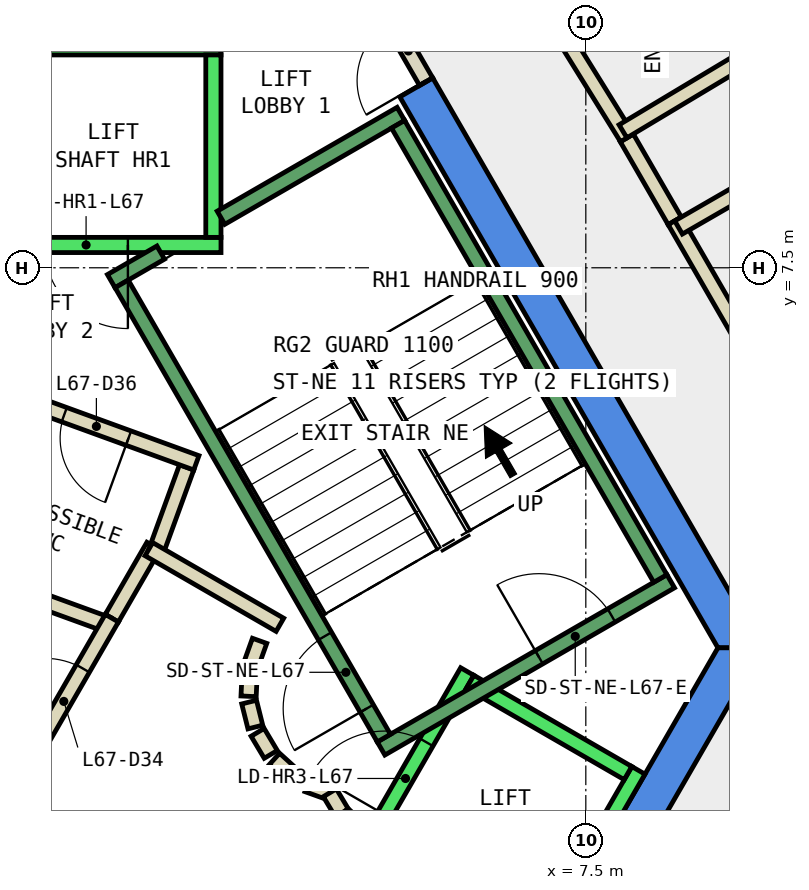
"""IFC4 building model, lengths in metres.
Left out: names, types, materials, properties, quantities, classifications, styles, units other than length and angle.
Written with IfcOpenShell. Run it as: python <this file> out.ifc"""

import sys

from ifc_helpers import new_model, si_unit, direction, frame, frame_2d, origin, place, context, subcontext, project, spatial, polyline, rectangle, outline, extrude, element, fill, save


model = new_model("IFC4")
c1 = context("Model", 3, precision=1e-05, world=origin(), true_north=direction((0.0, 1.0)))
c2 = subcontext(c1, "Body", "Model", "MODEL_VIEW")
j1 = project(units=[si_unit("LENGTHUNIT", "METRE"), si_unit("PLANEANGLEUNIT", "RADIAN")], contexts=[c1])
p1 = place(None, origin())
s1 = spatial("IfcSite", under=j1, at=p1, CompositionType="ELEMENT")
p2 = place(p1, origin())
s2 = spatial("IfcBuilding", under=s1, at=p2, CompositionType="ELEMENT")
p3 = place(p2, frame((0.0, 0.0, 290.0)))
s3 = spatial("IfcBuildingStorey", under=s2, at=p3, CompositionType="ELEMENT", Elevation=290.0)
p4 = place(p3, frame((0.0, 0.0, -0.34)))
e1 = element("IfcWall", 1, at=p4, inside=s3, PredefinedType="SHEAR", context=c2, shape_type="SweptSolid", body=[
    extrude(outline(polyline([(5.486, 9.998), (5.053, 9.748), (9.238, 2.5), (9.815, 2.5), (5.486, 9.998)])), origin(), (0.0, 0.0, 1.0), 3.6),
])
p5 = place(p3, frame((0.0, 0.0, -0.34)))
e2 = element("IfcWall", 2, at=p5, inside=s3, PredefinedType="SHEAR", context=c2, shape_type="SweptSolid", body=[
    extrude(outline(polyline([(4.907, -6.0), (9.815, 2.5), (9.238, 2.5), (4.619, -5.5), (4.907, -6.0)])), origin(), (0.0, 0.0, 1.0), 3.6),
])
p6 = place(p3, frame((1.264, 2.89, 0.0), z_axis=(0.0, 0.0, 1.0), x_axis=(0.500043792738, 0.866000118559, 0.0)))
e3 = element("IfcWall", 3, at=p6, inside=s3, PredefinedType="PARTITIONING", context=c2, shape_type="SweptSolid", body=[
    extrude(rectangle(XDim=1.096, YDim=0.2, at=frame_2d((0.548, 0.0))), origin(), (0.0, 0.0, 1.0), 3.26),
])
p7 = place(p3, frame((1.838, 3.748, 0.0), z_axis=(0.0, 0.0, 1.0), x_axis=(0.342266462435, 0.939602931398, 0.0)))
e4 = element("IfcWall", 4, at=p7, inside=s3, PredefinedType="PARTITIONING", context=c2, shape_type="SweptSolid", body=[
    extrude(rectangle(XDim=1.198, YDim=0.2, at=frame_2d((0.599, 0.0))), origin(), (0.0, 0.0, 1.0), 3.26),
])
p8 = place(p3, frame((2.376, 4.934, 0.0), z_axis=(0.0, 0.0, 1.0), x_axis=(-0.939640574808, 0.342163104635, 0.0)))
e5 = element("IfcWall", 5, at=p8, inside=s3, PredefinedType="PARTITIONING", context=c2, shape_type="SweptSolid", body=[
    extrude(rectangle(XDim=2.8, YDim=0.2, at=frame_2d((1.4, 0.0))), origin(), (0.0, 0.0, 1.0), 3.26),
])
p9 = place(p8, frame((0.95, 0.0, 0.0)))
e6 = element("IfcOpeningElement", 6, at=p9, cuts=e5, PredefinedType="OPENING", context=c2, shape_type="SweptSolid", body=[
    extrude(rectangle(XDim=0.9, YDim=2.1, at=frame_2d((0.45, 1.05))), frame((0.0, 0.11, 0.0), z_axis=(0.0, -1.0, 0.0), x_axis=(1.0, 0.0, 0.0)), (0.0, 0.0, 1.0), 0.22),
])
p10 = place(p3, frame((-0.888, 3.568, 0.0), z_axis=(0.0, 0.0, 1.0), x_axis=(0.939685034098, -0.34204098686, 0.0)))
e7 = element("IfcWall", 7, at=p10, inside=s3, PredefinedType="PARTITIONING", context=c2, shape_type="SweptSolid", body=[
    extrude(rectangle(XDim=2.237, YDim=0.2, at=frame_2d((1.119, 0.0))), origin(), (0.0, 0.0, 1.0), 3.26),
])
p11 = place(p3, frame((8.039, 9.209, 0.0), z_axis=(0.0, 0.0, 1.0), x_axis=(0.500219543227, -0.865898613334, 0.0)))
e8 = element("IfcWall", 8, at=p11, inside=s3, PredefinedType="PARTITIONING", context=c2, shape_type="SweptSolid", body=[
    extrude(rectangle(XDim=1.261, YDim=0.2, at=frame_2d((0.631, 0.0))), origin(), (0.0, 0.0, 1.0), 3.26),
])
p12 = place(p3, frame((8.67, 8.117, 0.0), z_axis=(0.0, 0.0, 1.0), x_axis=(0.50002537861, -0.866010750942, 0.0)))
e9 = element("IfcWall", 9, at=p12, inside=s3, PredefinedType="PARTITIONING", context=c2, shape_type="SweptSolid", body=[
    extrude(rectangle(XDim=3.0, YDim=0.2, at=frame_2d((1.5, 0.0))), origin(), (0.0, 0.0, 1.0), 3.26),
])
p13 = place(p3, frame((6.775, 11.249, 0.0), z_axis=(0.0, 0.0, 1.0), x_axis=(0.527803270752, -0.849366650736, 0.0)))
e10 = element("IfcWall", 10, at=p13, inside=s3, PredefinedType="PARTITIONING", context=c2, shape_type="SweptSolid", body=[
    extrude(rectangle(XDim=2.401, YDim=0.2, at=frame_2d((1.2, 0.0))), origin(), (0.0, 0.0, 1.0), 3.26),
])
p14 = place(p3, frame((0.05, 0.787, 0.0), z_axis=(0.0, 0.0, 1.0), x_axis=(0.499945861543, 0.866056658381, 0.0)))
e11 = element("IfcWall", 11, at=p14, inside=s3, PredefinedType="PARTITIONING", context=c2, shape_type="SweptSolid", body=[
    extrude(rectangle(XDim=2.428, YDim=0.2, at=frame_2d((1.214, 0.0))), origin(), (0.0, 0.0, 1.0), 3.26),
])
p15 = place(p14, frame((0.664, 0.0, 0.0)))
e12 = element("IfcOpeningElement", 12, at=p15, cuts=e11, PredefinedType="OPENING", context=c2, shape_type="SweptSolid", body=[
    extrude(rectangle(XDim=1.0, YDim=2.1, at=frame_2d((0.5, 1.05))), frame((0.0, 0.11, 0.0), z_axis=(0.0, -1.0, 0.0), x_axis=(1.0, 0.0, 0.0)), (0.0, 0.0, 1.0), 0.22),
])
p16 = place(p3, frame((1.751, 3.798, 0.0), z_axis=(0.0, 0.0, 1.0), x_axis=(0.866091650241, -0.499885240213, 0.0)))
e13 = element("IfcWall", 13, at=p16, inside=s3, PredefinedType="PARTITIONING", context=c2, shape_type="SweptSolid", body=[
    extrude(rectangle(XDim=1.991, YDim=0.2, at=frame_2d((0.995, 0.0))), origin(), (0.0, 0.0, 1.0), 3.26),
])
p17 = place(p3, frame((3.208, 2.592, 0.0), z_axis=(0.0, 0.0, 1.0), x_axis=(-0.337388820924, -0.941365382578, 0.0)))
e14 = element("IfcWall", 14, at=p17, inside=s3, PredefinedType="PARTITIONING", context=c2, shape_type="SweptSolid", body=[
    extrude(rectangle(XDim=0.338, YDim=0.2, at=frame_2d((0.169, 0.0))), origin(), (0.0, 0.0, 1.0), 3.26),
])
p18 = place(p3, frame((3.079, 2.199, 0.0), z_axis=(0.0, 0.0, 1.0), x_axis=(-0.047771483479, -0.998858290933, 0.0)))
e15 = element("IfcWall", 15, at=p18, inside=s3, PredefinedType="PARTITIONING", context=c2, shape_type="SweptSolid", body=[
    extrude(rectangle(XDim=0.337, YDim=0.2, at=frame_2d((0.169, 0.0))), origin(), (0.0, 0.0, 1.0), 3.26),
])
p19 = place(p3, frame((3.07, 1.786, 0.0), z_axis=(0.0, 0.0, 1.0), x_axis=(0.242705583207, -0.970099994784, 0.0)))
e16 = element("IfcWall", 16, at=p19, inside=s3, PredefinedType="PARTITIONING", context=c2, shape_type="SweptSolid", body=[
    extrude(rectangle(XDim=0.338, YDim=0.2, at=frame_2d((0.169, 0.0))), origin(), (0.0, 0.0, 1.0), 3.26),
])
for number, where, z_axis, x_axis in (
    (17, (3.182, 1.388, 0.0), (0.0, 0.0, 1.0), (0.512, -0.859, 0.0)),
    (18, (3.404, 1.039, 0.0), (0.0, 0.0, 1.0), (0.74, -0.672, 0.0)),
):
    element("IfcWall", number, at=place(p3, frame(where, z_axis=z_axis, x_axis=x_axis)), inside=s3, PredefinedType="PARTITIONING", context=c2, shape_type="SweptSolid", body=[
        extrude(rectangle(XDim=0.338, YDim=0.2, at=frame_2d((0.169, 0.0))), origin(), (0.0, 0.0, 1.0), 3.26),
    ])
p20 = place(p3, frame((3.838, 0.702, 0.0), z_axis=(0.0, 0.0, 1.0), x_axis=(0.941035081519, -0.338308993895, 0.0)))
e19 = element("IfcWall", 19, at=p20, inside=s3, PredefinedType="PARTITIONING", context=c2, shape_type="SweptSolid", body=[
    extrude(rectangle(XDim=0.337, YDim=0.2, at=frame_2d((0.168, 0.0))), origin(), (0.0, 0.0, 1.0), 3.26),
])
p21 = place(p3, frame((4.132, 0.593, 0.0), z_axis=(0.0, 0.0, 1.0), x_axis=(0.513561617048, -0.858052717201, 0.0)))
e20 = element("IfcWall", 20, at=p21, inside=s3, PredefinedType="PARTITIONING", context=c2, shape_type="SweptSolid", body=[
    extrude(rectangle(XDim=0.308, YDim=0.2, at=frame_2d((0.154, 0.0))), origin(), (0.0, 0.0, 1.0), 3.26),
])
p22 = place(p3, frame((4.301, 0.315, 0.0), z_axis=(0.0, 0.0, 1.0), x_axis=(0.741798017506, -0.670623367639, 0.0)))
e21 = element("IfcWall", 21, at=p22, inside=s3, PredefinedType="PARTITIONING", context=c2, shape_type="SweptSolid", body=[
    extrude(rectangle(XDim=0.309, YDim=0.2, at=frame_2d((0.154, 0.0))), origin(), (0.0, 0.0, 1.0), 3.26),
])
p23 = place(p3, frame((10.885, 9.28, 0.0), z_axis=(0.0, 0.0, 1.0), x_axis=(-0.866022959057, -0.500004234368, 0.0)))
e22 = element("IfcWall", 22, at=p23, inside=s3, PredefinedType="PARTITIONING", context=c2, shape_type="SweptSolid", body=[
    extrude(rectangle(XDim=2.5, YDim=0.2, at=frame_2d((1.25, 0.0))), origin(), (0.0, 0.0, 1.0), 3.26),
])
p24 = place(p3, frame((7.989, 9.295, 0.0), z_axis=(0.0, 0.0, 1.0), x_axis=(0.857801856135, 0.513980520654, 0.0)))
e23 = element("IfcWall", 23, at=p24, inside=s3, PredefinedType="PARTITIONING", context=c2, shape_type="SweptSolid", body=[
    extrude(rectangle(XDim=2.3, YDim=0.2, at=frame_2d((1.15, 0.0))), origin(), (0.0, 0.0, 1.0), 3.26),
])
p25 = place(p3, frame((5.399, 9.948, 0.0), z_axis=(0.0, 0.0, 1.0), x_axis=(-0.499882215713, 0.866093395895, 0.0)))
e24 = element("IfcWall", 24, at=p25, inside=s3, PredefinedType="PARTITIONING", context=c2, shape_type="SweptSolid", body=[
    extrude(rectangle(XDim=0.926, YDim=0.2, at=frame_2d((0.463, 0.0))), origin(), (0.0, 0.0, 1.0), 2.4),
])
p26 = place(p25, frame((0.017, 0.0, 0.0)))
e25 = element("IfcOpeningElement", 25, at=p26, cuts=e24, PredefinedType="OPENING", context=c2, shape_type="SweptSolid", body=[
    extrude(rectangle(XDim=0.9, YDim=2.1, at=frame_2d((0.45, 1.05))), frame((0.0, 0.11, 0.0), z_axis=(0.0, -1.0, 0.0), x_axis=(1.0, 0.0, 0.0)), (0.0, 0.0, 1.0), 0.22),
])
p27 = place(p3, frame((2.7, 7.8, 0.0), z_axis=(0.0, 0.0, 1.0), x_axis=(-1.0, 0.0, 0.0)))
e26 = element("IfcWall", 26, at=p27, inside=s3, PredefinedType="STANDARD", context=c2, shape_type="SweptSolid", body=[
    extrude(rectangle(XDim=5.4, YDim=0.2, at=frame_2d((2.7, 0.0))), origin(), (0.0, 0.0, 1.0), 3.26),
])
p28 = place(p27, frame((1.225, 0.0, 0.0)))
e27 = element("IfcOpeningElement", 27, at=p28, cuts=e26, PredefinedType="OPENING", context=c2, shape_type="SweptSolid", body=[
    extrude(rectangle(XDim=1.1, YDim=2.1, at=frame_2d((0.55, 1.05))), frame((0.0, 0.11, 0.0), z_axis=(0.0, -1.0, 0.0), x_axis=(1.0, 0.0, 0.0)), (0.0, 0.0, 1.0), 0.22),
])
p29 = place(p27, frame((3.075, 0.0, 0.0)))
e28 = element("IfcOpeningElement", 28, at=p29, cuts=e26, PredefinedType="OPENING", context=c2, shape_type="SweptSolid", body=[
    extrude(rectangle(XDim=1.1, YDim=2.1, at=frame_2d((0.55, 1.05))), frame((0.0, 0.11, 0.0), z_axis=(0.0, -1.0, 0.0), x_axis=(1.0, 0.0, 0.0)), (0.0, 0.0, 1.0), 0.22),
])
p30 = place(p3, frame((2.7, 10.4, 0.0), z_axis=(0.0, 0.0, 1.0), x_axis=(-1.0, 0.0, 0.0)))
e29 = element("IfcWall", 29, at=p30, inside=s3, PredefinedType="STANDARD", context=c2, shape_type="SweptSolid", body=[
    extrude(rectangle(XDim=5.4, YDim=0.2, at=frame_2d((2.7, 0.0))), origin(), (0.0, 0.0, 1.0), 3.26),
])
p31 = place(p3, frame((2.6, 7.9, 0.0), z_axis=(0.0, 0.0, 1.0), x_axis=(0.0, 1.0, 0.0)))
e30 = element("IfcWall", 30, at=p31, inside=s3, PredefinedType="STANDARD", context=c2, shape_type="SweptSolid", body=[
    extrude(rectangle(XDim=2.4, YDim=0.2, at=frame_2d((1.2, 0.0))), origin(), (0.0, 0.0, 1.0), 3.26),
])
p32 = place(p3, frame((3.24, -2.488, 0.0), z_axis=(0.0, 0.0, 1.0), x_axis=(0.500034260056, 0.866005622828, 0.0)))
e31 = element("IfcWall", 31, at=p32, inside=s3, PredefinedType="STANDARD", context=c2, shape_type="SweptSolid", body=[
    extrude(rectangle(XDim=5.399, YDim=0.2, at=frame_2d((2.7, 0.0))), origin(), (0.0, 0.0, 1.0), 3.26),
])
p33 = place(p32, frame((3.225, 0.0, 0.0)))
e32 = element("IfcOpeningElement", 32, at=p33, cuts=e31, PredefinedType="OPENING", context=c2, shape_type="SweptSolid", body=[
    extrude(rectangle(XDim=1.1, YDim=2.1, at=frame_2d((0.55, 1.05))), frame((0.0, 0.11, 0.0), z_axis=(0.0, -1.0, 0.0), x_axis=(1.0, 0.0, 0.0)), (0.0, 0.0, 1.0), 0.22),
])
p34 = place(p32, frame((1.225, 0.0, 0.0)))
e33 = element("IfcOpeningElement", 33, at=p34, cuts=e31, PredefinedType="OPENING", context=c2, shape_type="SweptSolid", body=[
    extrude(rectangle(XDim=1.1, YDim=2.1, at=frame_2d((0.55, 1.05))), frame((0.0, 0.11, 0.0), z_axis=(0.0, -1.0, 0.0), x_axis=(1.0, 0.0, 0.0)), (0.0, 0.0, 1.0), 0.22),
])
p35 = place(p3, frame((5.492, -3.788, 0.0), z_axis=(0.0, 0.0, 1.0), x_axis=(0.500034260056, 0.866005622828, 0.0)))
e34 = element("IfcWall", 34, at=p35, inside=s3, PredefinedType="STANDARD", context=c2, shape_type="SweptSolid", body=[
    extrude(rectangle(XDim=5.399, YDim=0.2, at=frame_2d((2.7, 0.0))), origin(), (0.0, 0.0, 1.0), 3.26),
])
p36 = place(p3, frame((5.977, 2.052, 0.0), z_axis=(0.0, 0.0, 1.0), x_axis=(0.865973769406, -0.500089422704, 0.0)))
e35 = element("IfcWall", 35, at=p36, inside=s3, PredefinedType="STANDARD", context=c2, shape_type="SweptSolid", body=[
    extrude(rectangle(XDim=2.399, YDim=0.2, at=frame_2d((1.2, 0.0))), origin(), (0.0, 0.0, 1.0), 3.26),
])
p37 = place(p3, frame((4.806, 1.176, 0.0), z_axis=(0.0, 0.0, 1.0), x_axis=(0.866059941101, 0.499940174841, 0.0)))
e36 = element("IfcWall", 36, at=p37, inside=s3, PredefinedType="STANDARD", context=c2, shape_type="SweptSolid", body=[
    extrude(rectangle(XDim=4.4, YDim=0.2, at=frame_2d((2.2, 0.0))), origin(), (0.0, 0.0, 1.0), 3.26),
])
p38 = place(p37, frame((2.4, 0.0, 0.0)))
e37 = element("IfcOpeningElement", 37, at=p38, cuts=e36, PredefinedType="OPENING", context=c2, shape_type="SweptSolid", body=[
    extrude(rectangle(XDim=1.1, YDim=2.2, at=frame_2d((0.55, 1.1))), frame((0.0, 0.11, 0.0), z_axis=(0.0, -1.0, 0.0), x_axis=(1.0, 0.0, 0.0)), (0.0, 0.0, 1.0), 0.22),
])
p39 = place(p3, frame((2.7, 8.158, 0.0), z_axis=(0.0, 0.0, 1.0), x_axis=(0.86611865017, 0.499838457731, 0.0)))
e38 = element("IfcWall", 38, at=p39, inside=s3, PredefinedType="STANDARD", context=c2, shape_type="SweptSolid", body=[
    extrude(rectangle(XDim=2.733, YDim=0.2, at=frame_2d((1.366, 0.0))), origin(), (0.0, 0.0, 1.0), 3.26),
])
p40 = place(p3, frame((1.256, 7.324, 0.0), z_axis=(0.0, 0.0, 1.0), x_axis=(0.865915093549, 0.500191014278, 0.0)))
e39 = element("IfcWall", 39, at=p40, inside=s3, PredefinedType="STANDARD", context=c2, shape_type="SweptSolid", body=[
    extrude(rectangle(XDim=0.752, YDim=0.2, at=frame_2d((0.376, 0.0))), origin(), (0.0, 0.0, 1.0), 3.26),
])
p41 = place(p3, frame((4.843, 1.312, 0.0), z_axis=(0.0, 0.0, 1.0), x_axis=(-0.499963383562, 0.866046543262, 0.0)))
e40 = element("IfcWall", 40, at=p41, inside=s3, PredefinedType="STANDARD", context=c2, shape_type="SweptSolid", body=[
    extrude(rectangle(XDim=6.9, YDim=0.2, at=frame_2d((3.45, 0.0))), origin(), (0.0, 0.0, 1.0), 3.26),
])
p42 = place(p41, frame((0.45, 0.0, 0.0)))
e41 = element("IfcOpeningElement", 41, at=p42, cuts=e40, PredefinedType="OPENING", context=c2, shape_type="SweptSolid", body=[
    extrude(rectangle(XDim=1.1, YDim=2.2, at=frame_2d((0.55, 1.1))), frame((0.0, 0.11, 0.0), z_axis=(0.0, -1.0, 0.0), x_axis=(1.0, 0.0, 0.0)), (0.0, 0.0, 1.0), 0.22),
])
p43 = place(p3, frame((8.48, 3.412, 0.0), z_axis=(0.0, 0.0, 1.0), x_axis=(-0.499978703459, 0.866037698999, 0.0)))
e42 = element("IfcWall", 42, at=p43, inside=s3, PredefinedType="STANDARD", context=c2, shape_type="SweptSolid", body=[
    extrude(rectangle(XDim=6.9, YDim=0.2, at=frame_2d((3.45, 0.0))), origin(), (0.0, 0.0, 1.0), 3.26),
])
p44 = place(p15, origin())
e43 = element("IfcDoor", 43, at=p44, inside=s3, OperationType="SINGLE_SWING_RIGHT", PredefinedType="DOOR", context=c2, shape_type="SweptSolid", body=[
    extrude(rectangle(XDim=1.0, YDim=2.1, at=frame_2d((0.5, 1.05))), frame((0.0, 0.025, 0.0), z_axis=(0.0, -1.0, 0.0), x_axis=(1.0, 0.0, 0.0)), (0.0, 0.0, 1.0), 0.05),
])
fill(e12, e43)
p45 = place(p9, origin())
e44 = element("IfcDoor", 44, at=p45, inside=s3, OperationType="SINGLE_SWING_LEFT", PredefinedType="DOOR", context=c2, shape_type="SweptSolid", body=[
    extrude(rectangle(XDim=0.9, YDim=2.1, at=frame_2d((0.45, 1.05))), frame((0.0, 0.025, 0.0), z_axis=(0.0, -1.0, 0.0), x_axis=(1.0, 0.0, 0.0)), (0.0, 0.0, 1.0), 0.05),
])
fill(e6, e44)
p46 = place(p26, origin())
e45 = element("IfcDoor", 45, at=p46, inside=s3, OperationType="SINGLE_SWING_LEFT", PredefinedType="DOOR", context=c2, shape_type="SweptSolid", body=[
    extrude(rectangle(XDim=0.9, YDim=2.1, at=frame_2d((0.45, 1.05))), frame((0.0, 0.025, 0.0), z_axis=(0.0, -1.0, 0.0), x_axis=(1.0, 0.0, 0.0)), (0.0, 0.0, 1.0), 0.05),
])
fill(e25, e45)
p47 = place(p28, origin())
e46 = element("IfcDoor", 46, at=p47, inside=s3, OperationType="SLIDING_TO_LEFT", PredefinedType="DOOR", context=c2, shape_type="SweptSolid", body=[
    extrude(rectangle(XDim=1.1, YDim=2.1, at=frame_2d((0.55, 1.05))), frame((0.0, 0.025, 0.0), z_axis=(0.0, -1.0, 0.0), x_axis=(1.0, 0.0, 0.0)), (0.0, 0.0, 1.0), 0.05),
])
fill(e27, e46)
p48 = place(p33, origin())
e47 = element("IfcDoor", 47, at=p48, inside=s3, OperationType="SLIDING_TO_LEFT", PredefinedType="DOOR", context=c2, shape_type="SweptSolid", body=[
    extrude(rectangle(XDim=1.1, YDim=2.1, at=frame_2d((0.55, 1.05))), frame((0.0, 0.025, 0.0), z_axis=(0.0, -1.0, 0.0), x_axis=(1.0, 0.0, 0.0)), (0.0, 0.0, 1.0), 0.05),
])
fill(e32, e47)
p49 = place(p42, origin())
e48 = element("IfcDoor", 48, at=p49, inside=s3, OperationType="SINGLE_SWING_LEFT", PredefinedType="DOOR", context=c2, shape_type="SweptSolid", body=[
    extrude(rectangle(XDim=1.1, YDim=2.2, at=frame_2d((0.55, 1.1))), frame((0.0, 0.025, 0.0), z_axis=(0.0, -1.0, 0.0), x_axis=(1.0, 0.0, 0.0)), (0.0, 0.0, 1.0), 0.05),
])
fill(e41, e48)
p50 = place(p38, origin())
e49 = element("IfcDoor", 49, at=p50, inside=s3, OperationType="SINGLE_SWING_LEFT", PredefinedType="DOOR", context=c2, shape_type="SweptSolid", body=[
    extrude(rectangle(XDim=1.1, YDim=2.2, at=frame_2d((0.55, 1.1))), frame((0.0, 0.025, 0.0), z_axis=(0.0, -1.0, 0.0), x_axis=(1.0, 0.0, 0.0)), (0.0, 0.0, 1.0), 0.05),
])
fill(e37, e49)
save(model, sys.argv[1])
